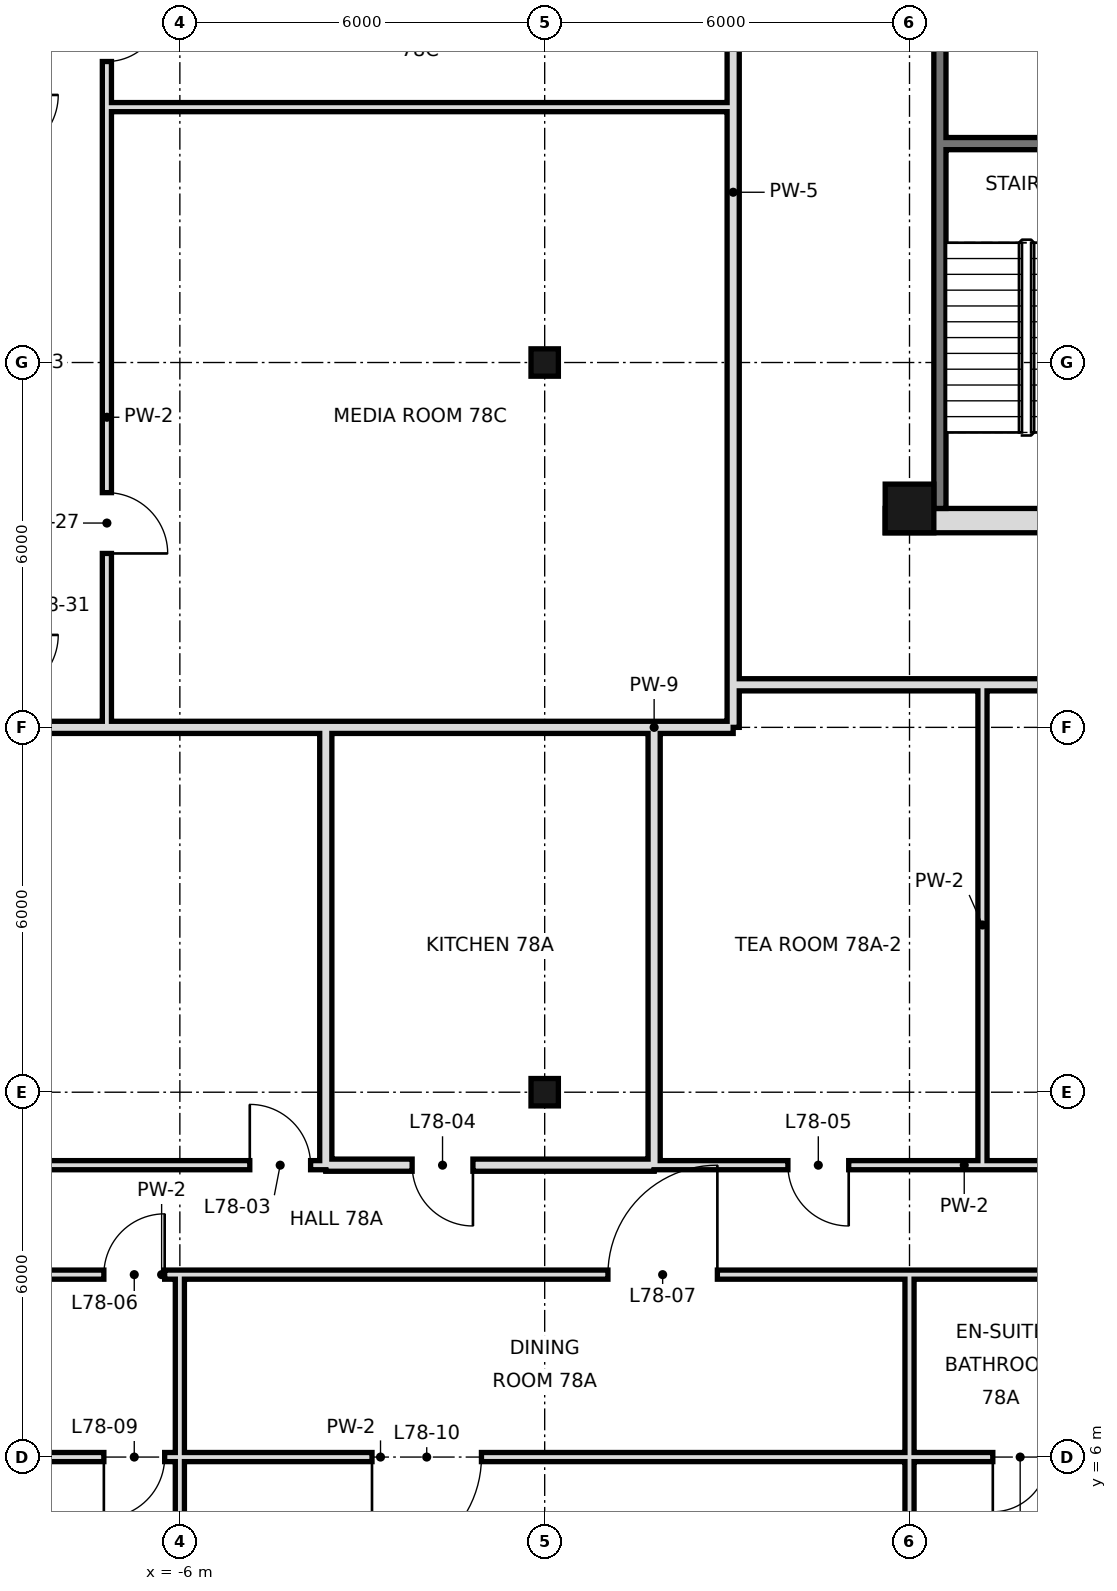
"""IFC4 building model, lengths in metres.
Left out: names, types, materials, properties, quantities, classifications, styles, units other than length and angle.
Written with IfcOpenShell. Run it as: python <this file> out.ifc"""

import sys

from ifc_helpers import new_model, si_unit, direction, frame, frame_2d, origin, origin_2d, place, context, subcontext, project, spatial, rectangle, hollow_rectangle, extrude, element, fill, save


model = new_model("IFC4")
c1 = context("Model", 3, precision=1e-05, world=origin(), true_north=direction((0.0, 1.0)))
c2 = subcontext(c1, "Body", "Model", "MODEL_VIEW")
j1 = project(units=[si_unit("LENGTHUNIT", "METRE"), si_unit("PLANEANGLEUNIT", "RADIAN")], contexts=[c1])
p1 = place(None, origin())
s1 = spatial("IfcSite", under=j1, at=p1, CompositionType="ELEMENT")
p2 = place(p1, origin())
s2 = spatial("IfcBuilding", under=s1, at=p2, CompositionType="ELEMENT")
p3 = place(p2, frame((0.0, 0.0, 326.8)))
s3 = spatial("IfcBuildingStorey", under=s2, at=p3, CompositionType="ELEMENT", Elevation=326.8)
for number, where, z_axis, x_axis in (
    (1, (0.0, 12.0, 0.0), (0.0, 0.0, 1.0), (1.0, 0.0, 0.0)),
    (2, (0.0, 24.0, 0.0), (0.0, 0.0, 1.0), (1.0, 0.0, 0.0)),
):
    element("IfcColumn", number, at=place(p3, frame(where, z_axis=z_axis, x_axis=x_axis)), inside=s3, PredefinedType="COLUMN", context=c2, shape_type="SweptSolid", body=[
        extrude(hollow_rectangle(XDim=0.45, YDim=0.45, WallThickness=0.022, at=origin_2d()), origin(), (0.0, 0.0, 1.0), 4.4),
    ])
p4 = place(p3, frame((6.0, 21.6, 0.0), z_axis=(0.0, 0.0, 1.0), x_axis=(1.0, 0.0, 0.0)))
e3 = element("IfcColumn", 3, at=p4, inside=s3, PredefinedType="COLUMN", context=c2, shape_type="SweptSolid", body=[
    extrude(hollow_rectangle(XDim=0.8, YDim=0.8, WallThickness=0.025, at=origin_2d()), origin(), (0.0, 0.0, 1.0), 4.4),
])
p5 = place(p3, frame((-3.6, 10.8, 0.0), z_axis=(0.0, 0.0, 1.0), x_axis=(0.0, 1.0, 0.0)))
e4 = element("IfcWall", 4, at=p5, inside=s3, PredefinedType="SOLIDWALL", context=c2, shape_type="SweptSolid", body=[
    extrude(rectangle(XDim=7.2, YDim=0.2, at=frame_2d((3.6, 0.0))), origin(), (0.0, 0.0, 1.0), 3.4),
])
p6 = place(p3, frame((-6.0, -0.6, 0.0), z_axis=(0.0, 0.0, 1.0), x_axis=(0.0, 1.0, 0.0)))
e5 = element("IfcWall", 5, at=p6, inside=s3, PredefinedType="PARTITIONING", context=c2, shape_type="SweptSolid", body=[
    extrude(rectangle(XDim=9.6, YDim=0.15, at=frame_2d((4.8, 0.0))), origin(), (0.0, 0.0, 1.0), 4.1),
])
p7 = place(p3, frame((-7.2, 18.0, 0.0), z_axis=(0.0, 0.0, 1.0), x_axis=(0.0, 1.0, 0.0)))
e6 = element("IfcWall", 6, at=p7, inside=s3, PredefinedType="PARTITIONING", context=c2, shape_type="SweptSolid", body=[
    extrude(rectangle(XDim=10.2, YDim=0.15, at=frame_2d((5.1, 0.0))), origin(), (0.0, 0.0, 1.0), 4.1),
])
p8 = place(p7, frame((2.86, 0.0, 0.0)))
e7 = element("IfcOpeningElement", 7, at=p8, cuts=e6, PredefinedType="OPENING", context=c2, shape_type="SweptSolid", body=[
    extrude(rectangle(XDim=1.0, YDim=2.4, at=frame_2d((0.5, 1.2))), frame((0.0, 0.085, 0.0), z_axis=(0.0, -1.0, 0.0), x_axis=(1.0, 0.0, 0.0)), (0.0, 0.0, 1.0), 0.17),
])
p9 = place(p3, frame((-7.2, 28.2, 0.0), z_axis=(0.0, 0.0, 1.0), x_axis=(0.0, 1.0, 0.0)))
e8 = element("IfcWall", 8, at=p9, inside=s3, PredefinedType="PARTITIONING", context=c2, shape_type="SweptSolid", body=[
    extrude(rectangle(XDim=2.4, YDim=0.15, at=frame_2d((1.2, 0.0))), origin(), (0.0, 0.0, 1.0), 4.1),
])
p10 = place(p9, frame((0.75, 0.0, 0.0)))
e9 = element("IfcOpeningElement", 9, at=p10, cuts=e8, PredefinedType="OPENING", context=c2, shape_type="SweptSolid", body=[
    extrude(rectangle(XDim=0.9, YDim=2.4, at=frame_2d((0.45, 1.2))), frame((0.0, 0.085, 0.0), z_axis=(0.0, -1.0, 0.0), x_axis=(1.0, 0.0, 0.0)), (0.0, 0.0, 1.0), 0.17),
])
p11 = place(p3, frame((1.8, 10.8, 0.0), z_axis=(0.0, 0.0, 1.0), x_axis=(0.0, 1.0, 0.0)))
e10 = element("IfcWall", 10, at=p11, inside=s3, PredefinedType="SOLIDWALL", context=c2, shape_type="SweptSolid", body=[
    extrude(rectangle(XDim=7.2, YDim=0.2, at=frame_2d((3.6, 0.0))), origin(), (0.0, 0.0, 1.0), 4.1),
])
p12 = place(p3, frame((3.1, 18.7, 0.0), z_axis=(0.0, 0.0, 1.0), x_axis=(0.0, 1.0, 0.0)))
e11 = element("IfcWall", 11, at=p12, inside=s3, PredefinedType="SOLIDWALL", context=c2, shape_type="SweptSolid", body=[
    extrude(rectangle(XDim=25.1, YDim=0.2, at=frame_2d((12.55, 0.0))), origin(), (0.0, 0.0, 1.0), 3.65),
])
p13 = place(p12, frame((15.16, 0.0, 0.0)))
e12 = element("IfcOpeningElement", 12, at=p13, cuts=e11, PredefinedType="OPENING", context=c2, shape_type="SweptSolid", body=[
    extrude(rectangle(XDim=1.2, YDim=2.4, at=frame_2d((0.6, 1.2))), frame((0.0, 0.11, 0.0), z_axis=(0.0, -1.0, 0.0), x_axis=(1.0, 0.0, 0.0)), (0.0, 0.0, 1.0), 0.22),
])
p14 = place(p3, frame((3.1, 18.0, 0.0), z_axis=(0.0, 0.0, 1.0), x_axis=(0.0, 1.0, 0.0)))
e13 = element("IfcWall", 13, at=p14, inside=s3, PredefinedType="SOLIDWALL", context=c2, shape_type="SweptSolid", body=[
    extrude(rectangle(XDim=0.7, YDim=0.2, at=frame_2d((0.35, 0.0))), origin(), (0.0, 0.0, 1.0), 3.65),
])
p15 = place(p3, frame((6.0, -0.6, 0.0), z_axis=(0.0, 0.0, 1.0), x_axis=(0.0, 1.0, 0.0)))
e14 = element("IfcWall", 14, at=p15, inside=s3, PredefinedType="PARTITIONING", context=c2, shape_type="SweptSolid", body=[
    extrude(rectangle(XDim=6.6, YDim=0.15, at=frame_2d((3.3, 0.0))), origin(), (0.0, 0.0, 1.0), 3.4),
])
p16 = place(p3, frame((6.0, 6.0, 0.0), z_axis=(0.0, 0.0, 1.0), x_axis=(0.0, 1.0, 0.0)))
e15 = element("IfcWall", 15, at=p16, inside=s3, PredefinedType="PARTITIONING", context=c2, shape_type="SweptSolid", body=[
    extrude(rectangle(XDim=3.0, YDim=0.15, at=frame_2d((1.5, 0.0))), origin(), (0.0, 0.0, 1.0), 3.4),
])
p17 = place(p3, frame((7.2, 10.8, 0.0), z_axis=(0.0, 0.0, 1.0), x_axis=(0.0, 1.0, 0.0)))
e16 = element("IfcWall", 16, at=p17, inside=s3, PredefinedType="PARTITIONING", context=c2, shape_type="SweptSolid", body=[
    extrude(rectangle(XDim=7.9, YDim=0.15, at=frame_2d((3.95, 0.0))), origin(), (0.0, 0.0, 1.0), 4.1),
])
p18 = place(p3, frame((-3.6, 10.8, 0.0), z_axis=(0.0, 0.0, 1.0), x_axis=(1.0, 0.0, 0.0)))
e17 = element("IfcWall", 17, at=p18, inside=s3, PredefinedType="SOLIDWALL", context=c2, shape_type="SweptSolid", body=[
    extrude(rectangle(XDim=5.4, YDim=0.2, at=frame_2d((2.7, 0.0))), origin(), (0.0, 0.0, 1.0), 3.4),
])
p19 = place(p18, frame((1.42, 0.0, 0.0)))
e18 = element("IfcOpeningElement", 18, at=p19, cuts=e17, PredefinedType="OPENING", context=c2, shape_type="SweptSolid", body=[
    extrude(rectangle(XDim=1.0, YDim=2.4, at=frame_2d((0.5, 1.2))), frame((0.0, 0.11, 0.0), z_axis=(0.0, -1.0, 0.0), x_axis=(1.0, 0.0, 0.0)), (0.0, 0.0, 1.0), 0.22),
])
p20 = place(p3, frame((-15.6, 10.8, 0.0), z_axis=(0.0, 0.0, 1.0), x_axis=(1.0, 0.0, 0.0)))
e19 = element("IfcWall", 19, at=p20, inside=s3, PredefinedType="PARTITIONING", context=c2, shape_type="SweptSolid", body=[
    extrude(rectangle(XDim=12.0, YDim=0.15, at=frame_2d((6.0, 0.0))), origin(), (0.0, 0.0, 1.0), 4.1),
])
p21 = place(p20, frame((10.75, 0.0, 0.0)))
e20 = element("IfcOpeningElement", 20, at=p21, cuts=e19, PredefinedType="OPENING", context=c2, shape_type="SweptSolid", body=[
    extrude(rectangle(XDim=1.0, YDim=2.4, at=frame_2d((0.5, 1.2))), frame((0.0, 0.085, 0.0), z_axis=(0.0, -1.0, 0.0), x_axis=(1.0, 0.0, 0.0)), (0.0, 0.0, 1.0), 0.17),
])
p22 = place(p3, frame((1.8, 10.8, 0.0), z_axis=(0.0, 0.0, 1.0), x_axis=(1.0, 0.0, 0.0)))
e21 = element("IfcWall", 21, at=p22, inside=s3, PredefinedType="PARTITIONING", context=c2, shape_type="SweptSolid", body=[
    extrude(rectangle(XDim=10.2, YDim=0.15, at=frame_2d((5.1, 0.0))), origin(), (0.0, 0.0, 1.0), 4.1),
])
p23 = place(p22, frame((6.64, 0.0, 0.0)))
e22 = element("IfcOpeningElement", 22, at=p23, cuts=e21, PredefinedType="OPENING", context=c2, shape_type="SweptSolid", body=[
    extrude(rectangle(XDim=1.0, YDim=2.4, at=frame_2d((0.5, 1.2))), frame((0.0, 0.085, 0.0), z_axis=(0.0, -1.0, 0.0), x_axis=(1.0, 0.0, 0.0)), (0.0, 0.0, 1.0), 0.17),
])
p24 = place(p22, frame((2.2, 0.0, 0.0)))
e23 = element("IfcOpeningElement", 23, at=p24, cuts=e21, PredefinedType="OPENING", context=c2, shape_type="SweptSolid", body=[
    extrude(rectangle(XDim=1.0, YDim=2.4, at=frame_2d((0.5, 1.2))), frame((0.0, 0.085, 0.0), z_axis=(0.0, -1.0, 0.0), x_axis=(1.0, 0.0, 0.0)), (0.0, 0.0, 1.0), 0.17),
])
p25 = place(p3, frame((-3.6, 18.0, 0.0), z_axis=(0.0, 0.0, 1.0), x_axis=(1.0, 0.0, 0.0)))
e24 = element("IfcWall", 24, at=p25, inside=s3, PredefinedType="SOLIDWALL", context=c2, shape_type="SweptSolid", body=[
    extrude(rectangle(XDim=5.4, YDim=0.2, at=frame_2d((2.7, 0.0))), origin(), (0.0, 0.0, 1.0), 3.4),
])
p26 = place(p3, frame((-18.6, 18.0, 0.0), z_axis=(0.0, 0.0, 1.0), x_axis=(1.0, 0.0, 0.0)))
e25 = element("IfcWall", 25, at=p26, inside=s3, PredefinedType="SOLIDWALL", context=c2, shape_type="SweptSolid", body=[
    extrude(rectangle(XDim=15.0, YDim=0.2, at=frame_2d((7.5, 0.0))), origin(), (0.0, 0.0, 1.0), 3.4),
])
p27 = place(p3, frame((1.8, 18.0, 0.0), z_axis=(0.0, 0.0, 1.0), x_axis=(1.0, 0.0, 0.0)))
e26 = element("IfcWall", 26, at=p27, inside=s3, PredefinedType="SOLIDWALL", context=c2, shape_type="SweptSolid", body=[
    extrude(rectangle(XDim=1.3, YDim=0.2, at=frame_2d((0.65, 0.0))), origin(), (0.0, 0.0, 1.0), 3.65),
])
p28 = place(p3, frame((3.1, 18.7, 0.0), z_axis=(0.0, 0.0, 1.0), x_axis=(1.0, 0.0, 0.0)))
e27 = element("IfcWall", 27, at=p28, inside=s3, PredefinedType="SOLIDWALL", context=c2, shape_type="SweptSolid", body=[
    extrude(rectangle(XDim=8.9, YDim=0.2, at=frame_2d((4.45, 0.0))), origin(), (0.0, 0.0, 1.0), 3.4),
])
p29 = place(p28, frame((5.9, 0.0, 0.0)))
e28 = element("IfcOpeningElement", 28, at=p29, cuts=e27, PredefinedType="OPENING", context=c2, shape_type="SweptSolid", body=[
    extrude(rectangle(XDim=1.2, YDim=2.4, at=frame_2d((0.6, 1.2))), frame((0.0, 0.11, 0.0), z_axis=(0.0, -1.0, 0.0), x_axis=(1.0, 0.0, 0.0)), (0.0, 0.0, 1.0), 0.22),
])
p30 = place(p3, frame((-7.2, 28.2, 0.0), z_axis=(0.0, 0.0, 1.0), x_axis=(1.0, 0.0, 0.0)))
e29 = element("IfcWall", 29, at=p30, inside=s3, PredefinedType="PARTITIONING", context=c2, shape_type="SweptSolid", body=[
    extrude(rectangle(XDim=10.3, YDim=0.15, at=frame_2d((5.15, 0.0))), origin(), (0.0, 0.0, 1.0), 4.1),
])
p31 = place(p3, frame((-18.0, 6.0, 0.0), z_axis=(0.0, 0.0, 1.0), x_axis=(1.0, 0.0, 0.0)))
e30 = element("IfcWall", 30, at=p31, inside=s3, PredefinedType="PARTITIONING", context=c2, shape_type="SweptSolid", body=[
    extrude(rectangle(XDim=24.0, YDim=0.15, at=frame_2d((12.0, 0.0))), origin(), (0.0, 0.0, 1.0), 3.4),
])
p32 = place(p31, frame((10.75, 0.0, 0.0)))
e31 = element("IfcOpeningElement", 31, at=p32, cuts=e30, PredefinedType="OPENING", context=c2, shape_type="SweptSolid", body=[
    extrude(rectangle(XDim=1.0, YDim=2.4, at=frame_2d((0.5, 1.2))), frame((0.0, 0.085, 0.0), z_axis=(0.0, -1.0, 0.0), x_axis=(1.0, 0.0, 0.0)), (0.0, 0.0, 1.0), 0.17),
])
p33 = place(p31, frame((15.16, 0.0, 0.0)))
e32 = element("IfcOpeningElement", 32, at=p33, cuts=e30, PredefinedType="OPENING", context=c2, shape_type="SweptSolid", body=[
    extrude(rectangle(XDim=1.8, YDim=2.4, at=frame_2d((0.9, 1.2))), frame((0.0, 0.085, 0.0), z_axis=(0.0, -1.0, 0.0), x_axis=(1.0, 0.0, 0.0)), (0.0, 0.0, 1.0), 0.17),
])
p34 = place(p3, frame((6.0, 6.0, 0.0), z_axis=(0.0, 0.0, 1.0), x_axis=(1.0, 0.0, 0.0)))
e33 = element("IfcWall", 33, at=p34, inside=s3, PredefinedType="PARTITIONING", context=c2, shape_type="SweptSolid", body=[
    extrude(rectangle(XDim=3.0, YDim=0.15, at=frame_2d((1.5, 0.0))), origin(), (0.0, 0.0, 1.0), 3.65),
])
p35 = place(p34, frame((1.37, 0.0, 0.0)))
e34 = element("IfcOpeningElement", 34, at=p35, cuts=e33, PredefinedType="OPENING", context=c2, shape_type="SweptSolid", body=[
    extrude(rectangle(XDim=0.9, YDim=2.4, at=frame_2d((0.45, 1.2))), frame((0.0, 0.085, 0.0), z_axis=(0.0, -1.0, 0.0), x_axis=(1.0, 0.0, 0.0)), (0.0, 0.0, 1.0), 0.17),
])
p36 = place(p3, frame((-18.6, 9.0, 0.0), z_axis=(0.0, 0.0, 1.0), x_axis=(1.0, 0.0, 0.0)))
e35 = element("IfcWall", 35, at=p36, inside=s3, PredefinedType="PARTITIONING", context=c2, shape_type="SweptSolid", body=[
    extrude(rectangle(XDim=24.6, YDim=0.15, at=frame_2d((12.3, 0.0))), origin(), (0.0, 0.0, 1.0), 4.1),
])
p37 = place(p36, frame((11.35, 0.0, 0.0)))
e36 = element("IfcOpeningElement", 36, at=p37, cuts=e35, PredefinedType="OPENING", context=c2, shape_type="SweptSolid", body=[
    extrude(rectangle(XDim=1.0, YDim=2.4, at=frame_2d((0.5, 1.2))), frame((0.0, 0.085, 0.0), z_axis=(0.0, -1.0, 0.0), x_axis=(1.0, 0.0, 0.0)), (0.0, 0.0, 1.0), 0.17),
])
p38 = place(p36, frame((19.64, 0.0, 0.0)))
e37 = element("IfcOpeningElement", 37, at=p38, cuts=e35, PredefinedType="OPENING", context=c2, shape_type="SweptSolid", body=[
    extrude(rectangle(XDim=1.8, YDim=2.4, at=frame_2d((0.9, 1.2))), frame((0.0, 0.085, 0.0), z_axis=(0.0, -1.0, 0.0), x_axis=(1.0, 0.0, 0.0)), (0.0, 0.0, 1.0), 0.17),
])
p39 = place(p3, frame((6.0, 9.0, 0.0), z_axis=(0.0, 0.0, 1.0), x_axis=(1.0, 0.0, 0.0)))
e38 = element("IfcWall", 38, at=p39, inside=s3, PredefinedType="PARTITIONING", context=c2, shape_type="SweptSolid", body=[
    extrude(rectangle(XDim=3.0, YDim=0.15, at=frame_2d((1.5, 0.0))), origin(), (0.0, 0.0, 1.0), 4.1),
])
p40 = place(p3, frame((6.5, 21.6, 0.0), z_axis=(0.0, 0.0, 1.0), x_axis=(0.0, 1.0, 0.0)))
e39 = element("IfcWall", 39, at=p40, inside=s3, PredefinedType="SOLIDWALL", context=c2, shape_type="SweptSolid", body=[
    extrude(rectangle(XDim=23.5, YDim=0.2, at=frame_2d((11.75, 0.0))), origin(), (0.0, 0.0, 1.0), 4.1),
])
p41 = place(p3, frame((5.6, 21.4, 0.0), z_axis=(0.0, 0.0, 1.0), x_axis=(1.0, 0.0, 0.0)))
e40 = element("IfcWall", 40, at=p41, inside=s3, PredefinedType="SOLIDWALL", context=c2, shape_type="SweptSolid", body=[
    extrude(rectangle(XDim=36.8, YDim=0.4, at=frame_2d((18.4, 0.0))), origin(), (0.0, 0.0, 1.0), 4.1),
])
p42 = place(p41, frame((8.5, 0.0, 0.0)))
e41 = element("IfcOpeningElement", 41, at=p42, cuts=e40, PredefinedType="OPENING", context=c2, shape_type="SweptSolid", body=[
    extrude(rectangle(XDim=1.8, YDim=2.1, at=frame_2d((0.9, 1.05))), frame((0.0, 0.21, 0.0), z_axis=(0.0, -1.0, 0.0), x_axis=(1.0, 0.0, 0.0)), (0.0, 0.0, 1.0), 0.42),
])
p43 = place(p41, frame((17.5, 0.0, 0.0)))
e42 = element("IfcOpeningElement", 42, at=p43, cuts=e40, PredefinedType="OPENING", context=c2, shape_type="SweptSolid", body=[
    extrude(rectangle(XDim=1.8, YDim=2.1, at=frame_2d((0.9, 1.05))), frame((0.0, 0.21, 0.0), z_axis=(0.0, -1.0, 0.0), x_axis=(1.0, 0.0, 0.0)), (0.0, 0.0, 1.0), 0.42),
])
p44 = place(p41, frame((26.5, 0.0, 0.0)))
e43 = element("IfcOpeningElement", 43, at=p44, cuts=e40, PredefinedType="OPENING", context=c2, shape_type="SweptSolid", body=[
    extrude(rectangle(XDim=1.8, YDim=2.1, at=frame_2d((0.9, 1.05))), frame((0.0, 0.21, 0.0), z_axis=(0.0, -1.0, 0.0), x_axis=(1.0, 0.0, 0.0)), (0.0, 0.0, 1.0), 0.42),
])
p45 = place(p41, frame((4.5, 0.0, 0.0)))
e44 = element("IfcOpeningElement", 44, at=p45, cuts=e40, PredefinedType="OPENING", context=c2, shape_type="SweptSolid", body=[
    extrude(rectangle(XDim=1.2, YDim=2.1, at=frame_2d((0.6, 1.05))), frame((0.0, 0.21, 0.0), z_axis=(0.0, -1.0, 0.0), x_axis=(1.0, 0.0, 0.0)), (0.0, 0.0, 1.0), 0.42),
])
p46 = place(p41, frame((31.1, 0.0, 0.0)))
e45 = element("IfcOpeningElement", 45, at=p46, cuts=e40, PredefinedType="OPENING", context=c2, shape_type="SweptSolid", body=[
    extrude(rectangle(XDim=1.2, YDim=2.1, at=frame_2d((0.6, 1.05))), frame((0.0, 0.21, 0.0), z_axis=(0.0, -1.0, 0.0), x_axis=(1.0, 0.0, 0.0)), (0.0, 0.0, 1.0), 0.42),
])
p47 = place(p3, frame((6.6, 27.6, 0.0), z_axis=(0.0, 0.0, 1.0), x_axis=(1.0, 0.0, 0.0)))
e46 = element("IfcWall", 46, at=p47, inside=s3, PredefinedType="SOLIDWALL", context=c2, shape_type="SweptSolid", body=[
    extrude(rectangle(XDim=5.3, YDim=0.2, at=frame_2d((2.65, 0.0))), origin(), (0.0, 0.0, 1.0), 4.1),
])
p48 = place(p21, origin())
e47 = element("IfcDoor", 47, at=p48, inside=s3, OperationType="SINGLE_SWING_LEFT", PredefinedType="DOOR", context=c2, shape_type="SweptSolid", body=[
    extrude(rectangle(XDim=1.0, YDim=2.4, at=frame_2d((0.5, 1.2))), frame((0.0, 0.025, 0.0), z_axis=(0.0, -1.0, 0.0), x_axis=(1.0, 0.0, 0.0)), (0.0, 0.0, 1.0), 0.05),
])
fill(e20, e47)
p49 = place(p19, origin())
e48 = element("IfcDoor", 48, at=p49, inside=s3, OperationType="SINGLE_SWING_RIGHT", PredefinedType="DOOR", context=c2, shape_type="SweptSolid", body=[
    extrude(rectangle(XDim=1.0, YDim=2.4, at=frame_2d((0.5, 1.2))), frame((0.0, 0.025, 0.0), z_axis=(0.0, -1.0, 0.0), x_axis=(1.0, 0.0, 0.0)), (0.0, 0.0, 1.0), 0.05),
])
fill(e18, e48)
p50 = place(p24, origin())
e49 = element("IfcDoor", 49, at=p50, inside=s3, OperationType="SINGLE_SWING_RIGHT", PredefinedType="DOOR", context=c2, shape_type="SweptSolid", body=[
    extrude(rectangle(XDim=1.0, YDim=2.4, at=frame_2d((0.5, 1.2))), frame((0.0, 0.025, 0.0), z_axis=(0.0, -1.0, 0.0), x_axis=(1.0, 0.0, 0.0)), (0.0, 0.0, 1.0), 0.05),
])
fill(e23, e49)
p51 = place(p37, frame((1.0, 0.0, 0.0), z_axis=(0.0, 0.0, 1.0), x_axis=(-1.0, 0.0, 0.0)))
e50 = element("IfcDoor", 50, at=p51, inside=s3, OperationType="SINGLE_SWING_LEFT", PredefinedType="DOOR", context=c2, shape_type="SweptSolid", body=[
    extrude(rectangle(XDim=1.0, YDim=2.4, at=frame_2d((0.5, 1.2))), frame((0.0, 0.025, 0.0), z_axis=(0.0, -1.0, 0.0), x_axis=(1.0, 0.0, 0.0)), (0.0, 0.0, 1.0), 0.05),
])
fill(e36, e50)
p52 = place(p38, frame((1.8, 0.0, 0.0), z_axis=(0.0, 0.0, 1.0), x_axis=(-1.0, 0.0, 0.0)))
e51 = element("IfcDoor", 51, at=p52, inside=s3, OperationType="SINGLE_SWING_LEFT", PredefinedType="DOOR", context=c2, shape_type="SweptSolid", body=[
    extrude(rectangle(XDim=1.8, YDim=2.4, at=frame_2d((0.9, 1.2))), frame((0.0, 0.025, 0.0), z_axis=(0.0, -1.0, 0.0), x_axis=(1.0, 0.0, 0.0)), (0.0, 0.0, 1.0), 0.05),
])
fill(e37, e51)
p53 = place(p32, frame((1.0, 0.0, 0.0), z_axis=(0.0, 0.0, 1.0), x_axis=(-1.0, 0.0, 0.0)))
e52 = element("IfcDoor", 52, at=p53, inside=s3, OperationType="SINGLE_SWING_RIGHT", PredefinedType="DOOR", context=c2, shape_type="SweptSolid", body=[
    extrude(rectangle(XDim=1.0, YDim=2.4, at=frame_2d((0.5, 1.2))), frame((0.0, 0.025, 0.0), z_axis=(0.0, -1.0, 0.0), x_axis=(1.0, 0.0, 0.0)), (0.0, 0.0, 1.0), 0.05),
])
fill(e31, e52)
p54 = place(p33, frame((1.8, 0.0, 0.0), z_axis=(0.0, 0.0, 1.0), x_axis=(-1.0, 0.0, 0.0)))
e53 = element("IfcDoor", 53, at=p54, inside=s3, OperationType="SINGLE_SWING_RIGHT", PredefinedType="DOOR", context=c2, shape_type="SweptSolid", body=[
    extrude(rectangle(XDim=1.8, YDim=2.4, at=frame_2d((0.9, 1.2))), frame((0.0, 0.025, 0.0), z_axis=(0.0, -1.0, 0.0), x_axis=(1.0, 0.0, 0.0)), (0.0, 0.0, 1.0), 0.05),
])
fill(e32, e53)
p55 = place(p35, frame((0.9, 0.0, 0.0), z_axis=(0.0, 0.0, 1.0), x_axis=(-1.0, 0.0, 0.0)))
e54 = element("IfcDoor", 54, at=p55, inside=s3, OperationType="SINGLE_SWING_RIGHT", PredefinedType="DOOR", context=c2, shape_type="SweptSolid", body=[
    extrude(rectangle(XDim=0.9, YDim=2.4, at=frame_2d((0.45, 1.2))), frame((0.0, 0.025, 0.0), z_axis=(0.0, -1.0, 0.0), x_axis=(1.0, 0.0, 0.0)), (0.0, 0.0, 1.0), 0.05),
])
fill(e34, e54)
p56 = place(p8, frame((1.0, 0.0, 0.0), z_axis=(0.0, 0.0, 1.0), x_axis=(-1.0, 0.0, 0.0)))
e55 = element("IfcDoor", 55, at=p56, inside=s3, OperationType="SINGLE_SWING_RIGHT", PredefinedType="DOOR", context=c2, shape_type="SweptSolid", body=[
    extrude(rectangle(XDim=1.0, YDim=2.4, at=frame_2d((0.5, 1.2))), frame((0.0, 0.025, 0.0), z_axis=(0.0, -1.0, 0.0), x_axis=(1.0, 0.0, 0.0)), (0.0, 0.0, 1.0), 0.05),
])
fill(e7, e55)
p57 = place(p10, origin())
e56 = element("IfcDoor", 56, at=p57, inside=s3, OperationType="SINGLE_SWING_RIGHT", PredefinedType="DOOR", context=c2, shape_type="SweptSolid", body=[
    extrude(rectangle(XDim=0.9, YDim=2.4, at=frame_2d((0.45, 1.2))), frame((0.0, 0.025, 0.0), z_axis=(0.0, -1.0, 0.0), x_axis=(1.0, 0.0, 0.0)), (0.0, 0.0, 1.0), 0.05),
])
fill(e9, e56)
save(model, sys.argv[1])
